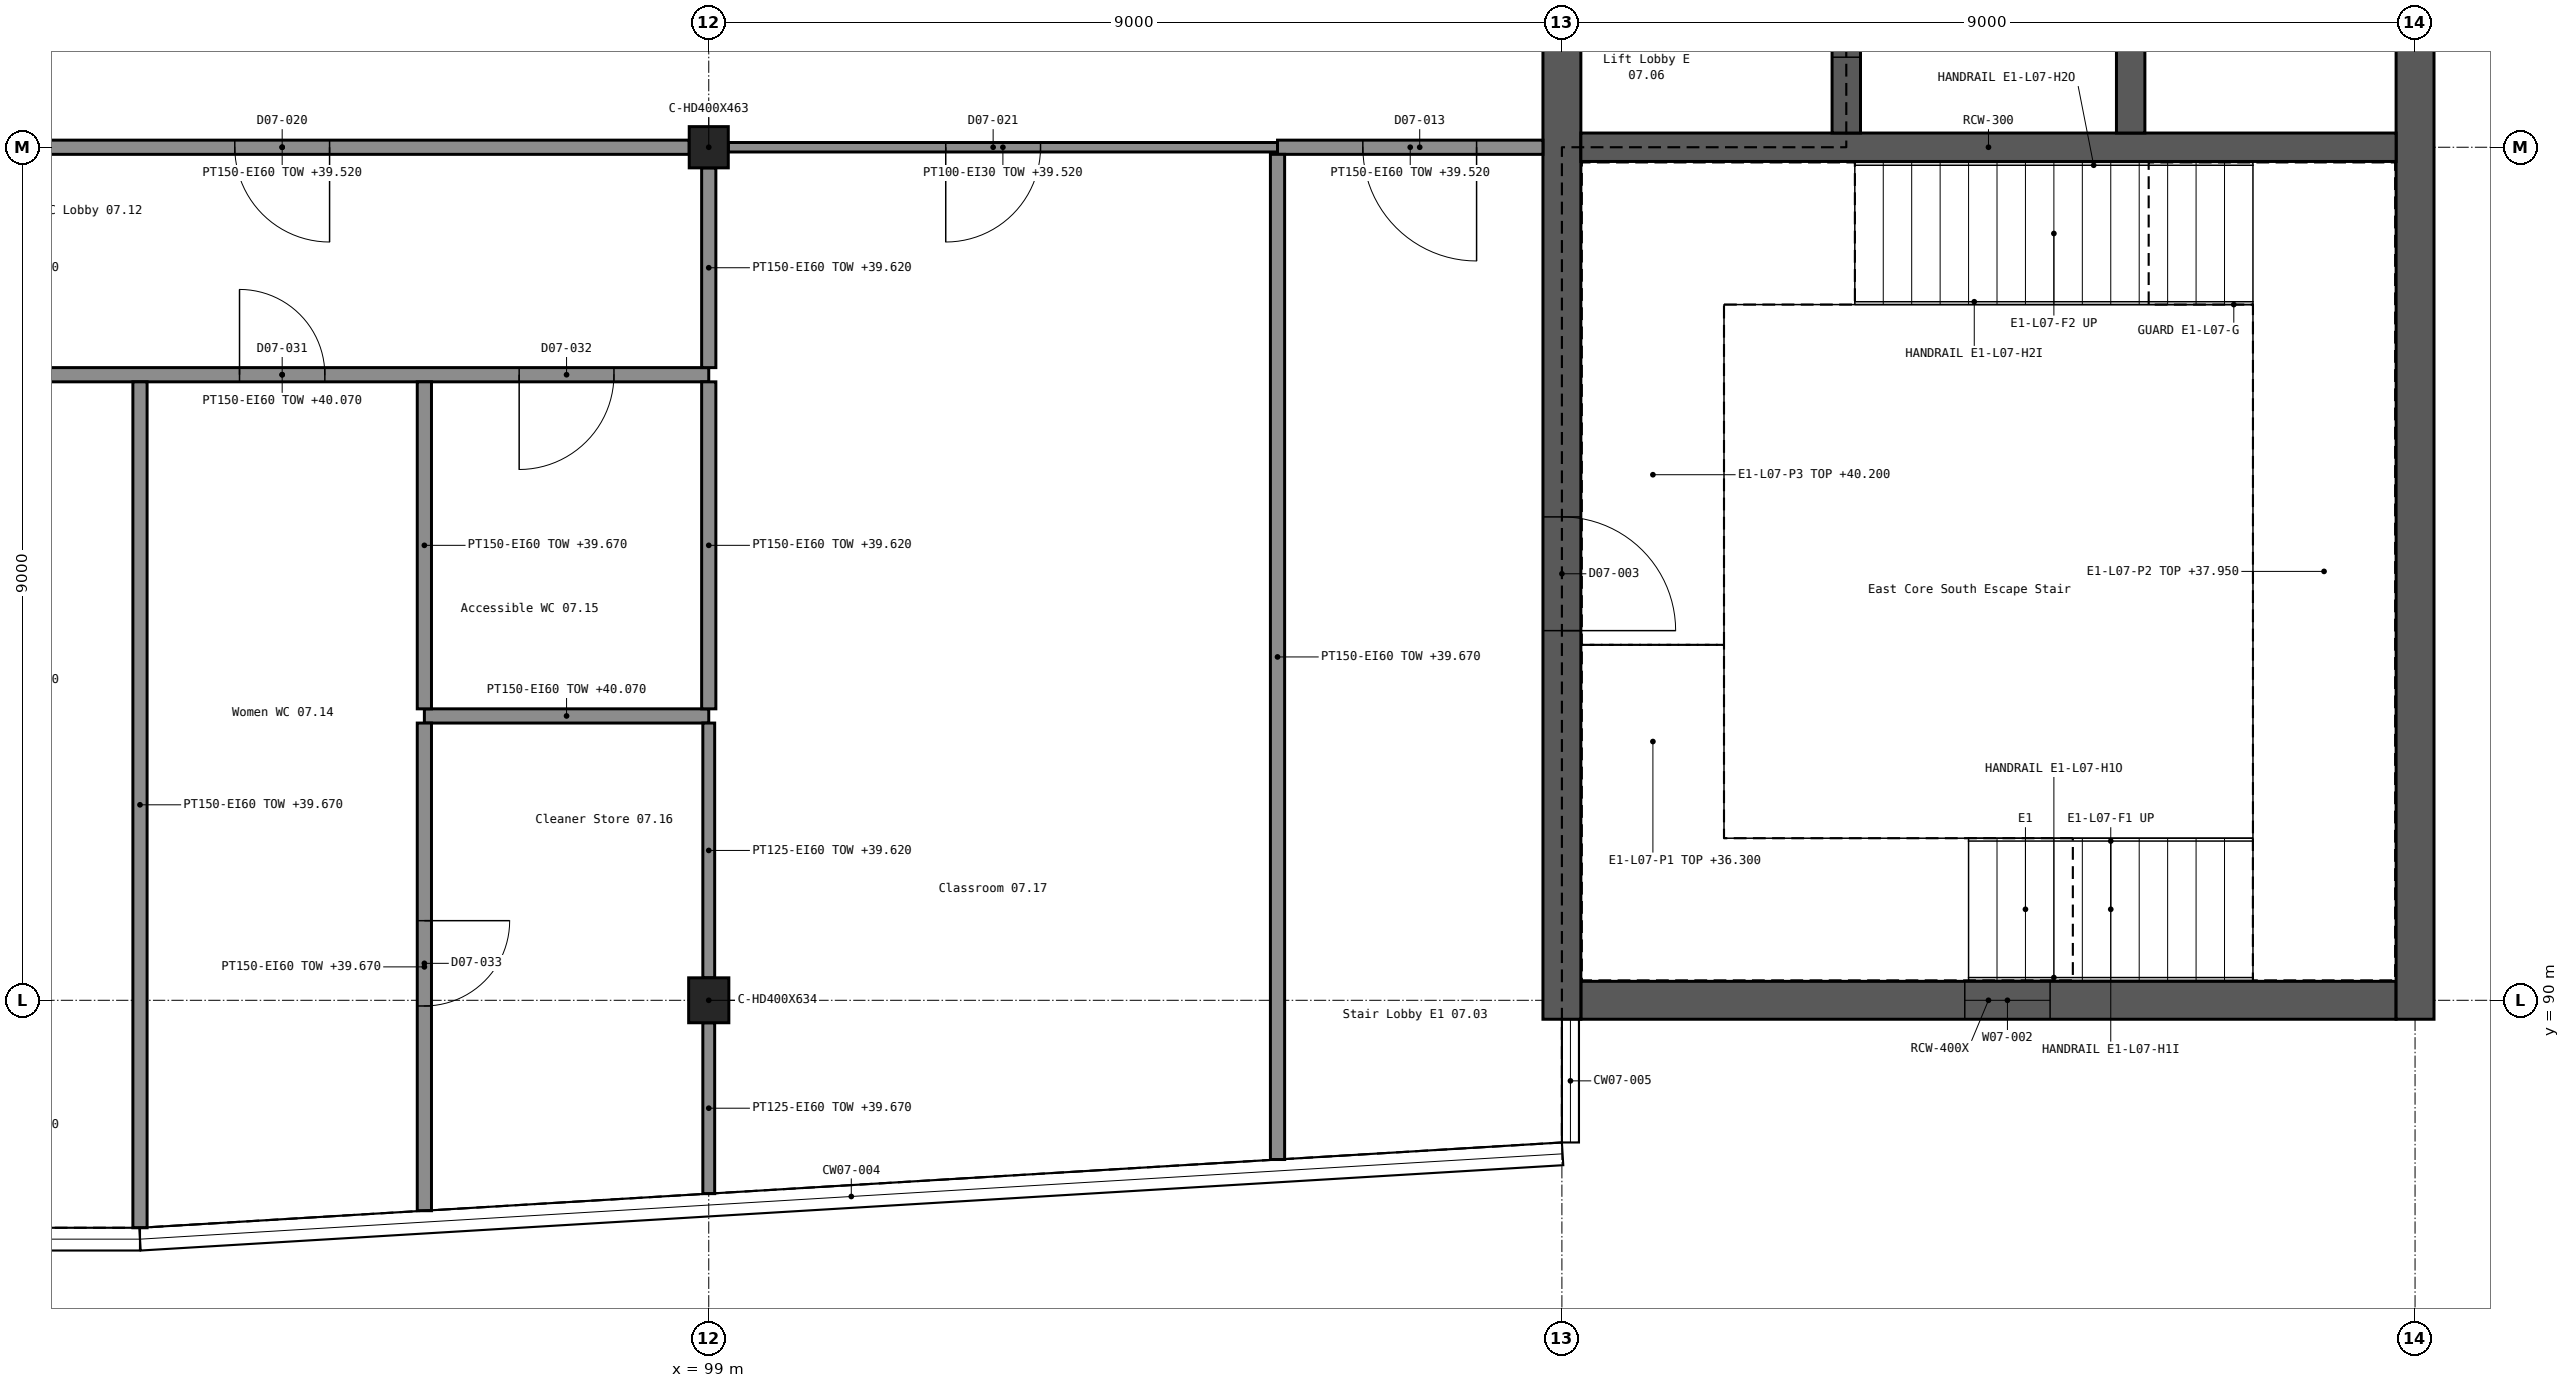
"""IFC4 building model, lengths in metres.
Left out: names, types, materials, properties, quantities, classifications, styles, units other than length and angle.
Written with IfcOpenShell. Run it as: python <this file> out.ifc"""

import sys

from ifc_helpers import new_model, si_unit, direction, frame, frame_2d, origin, origin_2d, place, context, subcontext, project, spatial, rectangle, i_section, extrude, element, fill, save


model = new_model("IFC4")
c1 = context("Model", 3, precision=1e-05, world=origin(), true_north=direction((0.0, 1.0)))
c2 = subcontext(c1, "Body", "Model", "MODEL_VIEW")
j1 = project(units=[si_unit("LENGTHUNIT", "METRE"), si_unit("PLANEANGLEUNIT", "RADIAN")], contexts=[c1])
p1 = place(None, origin())
s1 = spatial("IfcSite", under=j1, at=p1, CompositionType="ELEMENT")
p2 = place(p1, origin())
s2 = spatial("IfcBuilding", under=s1, at=p2, CompositionType="ELEMENT")
p3 = place(p2, frame((0.0, 0.0, 36.3)))
s3 = spatial("IfcBuildingStorey", under=s2, at=p3, CompositionType="ELEMENT", Elevation=36.3)
p4 = place(p3, frame((108.2, 90.0, 0.0), z_axis=(0.0, 0.0, 1.0), x_axis=(1.0, 0.0, 0.0)))
e1 = element("IfcWall", 1, at=p4, inside=s3, PredefinedType="SHEAR", context=c2, shape_type="SweptSolid", body=[
    extrude(rectangle(XDim=8.6, YDim=0.4, at=frame_2d((4.3, 0.0))), origin(), (0.0, 0.0, 1.0), 3.9),
])
p5 = place(p4, frame((4.05, 0.0, 1.2)))
e2 = element("IfcOpeningElement", 2, at=p5, cuts=e1, PredefinedType="OPENING", context=c2, shape_type="SweptSolid", body=[
    extrude(rectangle(XDim=0.9, YDim=1.5, at=frame_2d((0.45, 0.75))), frame((0.0, 0.211, 0.0), z_axis=(0.0, -1.0, 0.0), x_axis=(1.0, 0.0, 0.0)), (0.0, 0.0, 1.0), 0.422),
])
p6 = place(p3, frame((108.0, 89.8, 0.0), z_axis=(0.0, 0.0, 1.0), x_axis=(0.0, 1.0, 0.0)))
e3 = element("IfcWall", 3, at=p6, inside=s3, PredefinedType="SHEAR", context=c2, shape_type="SweptSolid", body=[
    extrude(rectangle(XDim=27.4, YDim=0.4, at=frame_2d((13.7, 0.0))), origin(), (0.0, 0.0, 1.0), 3.9),
])
p7 = place(p6, frame((4.1, 0.0, 0.0)))
e4 = element("IfcOpeningElement", 4, at=p7, cuts=e3, PredefinedType="OPENING", context=c2, shape_type="SweptSolid", body=[
    extrude(rectangle(XDim=1.2, YDim=2.1, at=frame_2d((0.6, 1.05))), frame((0.0, 0.211, 0.0), z_axis=(0.0, -1.0, 0.0), x_axis=(1.0, 0.0, 0.0)), (0.0, 0.0, 1.0), 0.422),
])
p8 = place(p6, frame((22.1, 0.0, 0.0)))
e5 = element("IfcOpeningElement", 5, at=p8, cuts=e3, PredefinedType="OPENING", context=c2, shape_type="SweptSolid", body=[
    extrude(rectangle(XDim=1.2, YDim=2.1, at=frame_2d((0.6, 1.05))), frame((0.0, 0.211, 0.0), z_axis=(0.0, -1.0, 0.0), x_axis=(1.0, 0.0, 0.0)), (0.0, 0.0, 1.0), 0.422),
])
p9 = place(p6, frame((12.5, 0.0, 0.0)))
e6 = element("IfcOpeningElement", 6, at=p9, cuts=e3, PredefinedType="OPENING", context=c2, shape_type="SweptSolid", body=[
    extrude(rectangle(XDim=2.0, YDim=2.1, at=frame_2d((1.0, 1.05))), frame((0.0, 0.211, 0.0), z_axis=(0.0, -1.0, 0.0), x_axis=(1.0, 0.0, 0.0)), (0.0, 0.0, 1.0), 0.422),
])
p10 = place(p3, frame((117.0, 89.8, 0.0), z_axis=(0.0, 0.0, 1.0), x_axis=(0.0, 1.0, 0.0)))
e7 = element("IfcWall", 7, at=p10, inside=s3, PredefinedType="SHEAR", context=c2, shape_type="SweptSolid", body=[
    extrude(rectangle(XDim=27.4, YDim=0.4, at=frame_2d((13.7, 0.0))), origin(), (0.0, 0.0, 1.0), 3.9),
])
p11 = place(p3, frame((108.2, 99.0, 0.0), z_axis=(0.0, 0.0, 1.0), x_axis=(1.0, 0.0, 0.0)))
e8 = element("IfcWall", 8, at=p11, inside=s3, PredefinedType="SHEAR", context=c2, shape_type="SweptSolid", body=[
    extrude(rectangle(XDim=8.6, YDim=0.3, at=frame_2d((4.3, 0.0))), origin(), (0.0, 0.0, 1.0), 3.9),
])
p12 = place(p3, frame((111.0, 99.15, 0.0), z_axis=(0.0, 0.0, 1.0), x_axis=(0.0, 1.0, 0.0)))
e9 = element("IfcWall", 9, at=p12, inside=s3, PredefinedType="SHEAR", context=c2, shape_type="SweptSolid", body=[
    extrude(rectangle(XDim=8.7, YDim=0.3, at=frame_2d((4.35, 0.0))), origin(), (0.0, 0.0, 1.0), 3.9),
])
p13 = place(p12, frame((0.8, 0.0, 0.0)))
e10 = element("IfcOpeningElement", 10, at=p13, cuts=e9, PredefinedType="OPENING", context=c2, shape_type="SweptSolid", body=[
    extrude(rectangle(XDim=1.1, YDim=2.1, at=frame_2d((0.55, 1.05))), frame((0.0, 0.161, 0.0), z_axis=(0.0, -1.0, 0.0), x_axis=(1.0, 0.0, 0.0)), (0.0, 0.0, 1.0), 0.322),
])
p14 = place(p12, frame((3.8, 0.0, 0.0)))
e11 = element("IfcOpeningElement", 11, at=p14, cuts=e9, PredefinedType="OPENING", context=c2, shape_type="SweptSolid", body=[
    extrude(rectangle(XDim=1.1, YDim=2.1, at=frame_2d((0.55, 1.05))), frame((0.0, 0.161, 0.0), z_axis=(0.0, -1.0, 0.0), x_axis=(1.0, 0.0, 0.0)), (0.0, 0.0, 1.0), 0.322),
])
p15 = place(p12, frame((6.8, 0.0, 0.0)))
e12 = element("IfcOpeningElement", 12, at=p15, cuts=e9, PredefinedType="OPENING", context=c2, shape_type="SweptSolid", body=[
    extrude(rectangle(XDim=1.1, YDim=2.1, at=frame_2d((0.55, 1.05))), frame((0.0, 0.161, 0.0), z_axis=(0.0, -1.0, 0.0), x_axis=(1.0, 0.0, 0.0)), (0.0, 0.0, 1.0), 0.322),
])
p16 = place(p3, frame((114.0, 99.15, 0.0), z_axis=(0.0, 0.0, 1.0), x_axis=(0.0, 1.0, 0.0)))
e13 = element("IfcWall", 13, at=p16, inside=s3, PredefinedType="SHEAR", context=c2, shape_type="SweptSolid", body=[
    extrude(rectangle(XDim=8.7, YDim=0.3, at=frame_2d((4.35, 0.0))), origin(), (0.0, 0.0, 1.0), 3.9),
])
p17 = place(p3, frame((99.0, 90.0, 0.0), z_axis=(0.0, 0.0, 1.0), x_axis=(1.0, 0.0, 0.0)))
e14 = element("IfcColumn", 14, at=p17, inside=s3, PredefinedType="COLUMN", context=c2, shape_type="SweptSolid", body=[
    extrude(i_section(OverallWidth=0.424, OverallDepth=0.474, WebThickness=0.048, FlangeThickness=0.077, FilletRadius=0.015, at=origin_2d()), origin(), (0.0, 0.0, 1.0), 3.9),
])
p18 = place(p3, frame((99.0, 99.0, 0.0), z_axis=(0.0, 0.0, 1.0), x_axis=(1.0, 0.0, 0.0)))
e15 = element("IfcColumn", 15, at=p18, inside=s3, PredefinedType="COLUMN", context=c2, shape_type="SweptSolid", body=[
    extrude(i_section(OverallWidth=0.412, OverallDepth=0.435, WebThickness=0.036, FlangeThickness=0.057, FilletRadius=0.015, at=origin_2d()), origin(), (0.0, 0.0, 1.0), 3.9),
])
p19 = place(p3, frame((96.0, 93.0, 0.0), z_axis=(0.0, 0.0, 1.0), x_axis=(1.0, 0.0, 0.0)))
e16 = element("IfcWall", 16, at=p19, inside=s3, PredefinedType="PARTITIONING", context=c2, shape_type="SweptSolid", body=[
    extrude(rectangle(XDim=3.0, YDim=0.15, at=frame_2d((1.5, 0.0))), origin(), (0.0, 0.0, 1.0), 3.77),
])
p20 = place(p3, frame((90.0, 96.6, 0.0), z_axis=(0.0, 0.0, 1.0), x_axis=(1.0, 0.0, 0.0)))
e17 = element("IfcWall", 17, at=p20, inside=s3, PredefinedType="PARTITIONING", context=c2, shape_type="SweptSolid", body=[
    extrude(rectangle(XDim=9.0, YDim=0.15, at=frame_2d((4.5, 0.0))), origin(), (0.0, 0.0, 1.0), 3.77),
])
p21 = place(p20, frame((1.05, 0.0, 0.0)))
e18 = element("IfcOpeningElement", 18, at=p21, cuts=e17, PredefinedType="OPENING", context=c2, shape_type="SweptSolid", body=[
    extrude(rectangle(XDim=0.9, YDim=2.1, at=frame_2d((0.45, 1.05))), frame((0.0, 0.086, 0.0), z_axis=(0.0, -1.0, 0.0), x_axis=(1.0, 0.0, 0.0)), (0.0, 0.0, 1.0), 0.172),
])
p22 = place(p20, frame((4.05, 0.0, 0.0)))
e19 = element("IfcOpeningElement", 19, at=p22, cuts=e17, PredefinedType="OPENING", context=c2, shape_type="SweptSolid", body=[
    extrude(rectangle(XDim=0.9, YDim=2.1, at=frame_2d((0.45, 1.05))), frame((0.0, 0.086, 0.0), z_axis=(0.0, -1.0, 0.0), x_axis=(1.0, 0.0, 0.0)), (0.0, 0.0, 1.0), 0.172),
])
p23 = place(p20, frame((7.0, 0.0, 0.0)))
e20 = element("IfcOpeningElement", 20, at=p23, cuts=e17, PredefinedType="OPENING", context=c2, shape_type="SweptSolid", body=[
    extrude(rectangle(XDim=1.0, YDim=2.1, at=frame_2d((0.5, 1.05))), frame((0.0, 0.086, 0.0), z_axis=(0.0, -1.0, 0.0), x_axis=(1.0, 0.0, 0.0)), (0.0, 0.0, 1.0), 0.172),
])
p24 = place(p3, frame((99.206, 99.0, 0.0), z_axis=(0.0, 0.0, 1.0), x_axis=(1.0, 0.0, 0.0)))
e21 = element("IfcWall", 21, at=p24, inside=s3, PredefinedType="PARTITIONING", context=c2, shape_type="SweptSolid", body=[
    extrude(rectangle(XDim=5.794, YDim=0.1, at=frame_2d((2.897, 0.0))), origin(), (0.0, 0.0, 1.0), 3.22),
])
p25 = place(p24, frame((2.294, 0.0, 0.0)))
e22 = element("IfcOpeningElement", 22, at=p25, cuts=e21, PredefinedType="OPENING", context=c2, shape_type="SweptSolid", body=[
    extrude(rectangle(XDim=1.0, YDim=2.1, at=frame_2d((0.5, 1.05))), frame((0.0, 0.061, 0.0), z_axis=(0.0, -1.0, 0.0), x_axis=(1.0, 0.0, 0.0)), (0.0, 0.0, 1.0), 0.122),
])
p26 = place(p3, frame((90.206, 99.0, 0.0), z_axis=(0.0, 0.0, 1.0), x_axis=(1.0, 0.0, 0.0)))
e23 = element("IfcWall", 23, at=p26, inside=s3, PredefinedType="PARTITIONING", context=c2, shape_type="SweptSolid", body=[
    extrude(rectangle(XDim=8.588, YDim=0.15, at=frame_2d((4.294, 0.0))), origin(), (0.0, 0.0, 1.0), 3.22),
])
p27 = place(p26, frame((3.794, 0.0, 0.0)))
e24 = element("IfcOpeningElement", 24, at=p27, cuts=e23, PredefinedType="OPENING", context=c2, shape_type="SweptSolid", body=[
    extrude(rectangle(XDim=1.0, YDim=2.1, at=frame_2d((0.5, 1.05))), frame((0.0, 0.086, 0.0), z_axis=(0.0, -1.0, 0.0), x_axis=(1.0, 0.0, 0.0)), (0.0, 0.0, 1.0), 0.172),
])
p28 = place(p3, frame((105.0, 99.0, 0.0), z_axis=(0.0, 0.0, 1.0), x_axis=(1.0, 0.0, 0.0)))
e25 = element("IfcWall", 25, at=p28, inside=s3, PredefinedType="PARTITIONING", context=c2, shape_type="SweptSolid", body=[
    extrude(rectangle(XDim=2.8, YDim=0.15, at=frame_2d((1.4, 0.0))), origin(), (0.0, 0.0, 1.0), 3.22),
])
p29 = place(p28, frame((0.9, 0.0, 0.0)))
e26 = element("IfcOpeningElement", 26, at=p29, cuts=e25, PredefinedType="OPENING", context=c2, shape_type="SweptSolid", body=[
    extrude(rectangle(XDim=1.2, YDim=2.1, at=frame_2d((0.6, 1.05))), frame((0.0, 0.086, 0.0), z_axis=(0.0, -1.0, 0.0), x_axis=(1.0, 0.0, 0.0)), (0.0, 0.0, 1.0), 0.172),
])
p30 = place(p3, frame((93.0, 87.6, 0.0), z_axis=(0.0, 0.0, 1.0), x_axis=(0.0, 1.0, 0.0)))
e27 = element("IfcWall", 27, at=p30, inside=s3, PredefinedType="PARTITIONING", context=c2, shape_type="SweptSolid", body=[
    extrude(rectangle(XDim=8.925, YDim=0.15, at=frame_2d((4.462, 0.0))), origin(), (0.0, 0.0, 1.0), 3.37),
])
p31 = place(p3, frame((96.0, 87.78, 0.0), z_axis=(0.0, 0.0, 1.0), x_axis=(0.0, 1.0, 0.0)))
e28 = element("IfcWall", 28, at=p31, inside=s3, PredefinedType="PARTITIONING", context=c2, shape_type="SweptSolid", body=[
    extrude(rectangle(XDim=5.145, YDim=0.15, at=frame_2d((2.573, 0.0))), origin(), (0.0, 0.0, 1.0), 3.37),
])
p32 = place(p31, frame((2.16, 0.0, 0.0)))
e29 = element("IfcOpeningElement", 29, at=p32, cuts=e28, PredefinedType="OPENING", context=c2, shape_type="SweptSolid", body=[
    extrude(rectangle(XDim=0.9, YDim=2.1, at=frame_2d((0.45, 1.05))), frame((0.0, 0.086, 0.0), z_axis=(0.0, -1.0, 0.0), x_axis=(1.0, 0.0, 0.0)), (0.0, 0.0, 1.0), 0.172),
])
p33 = place(p3, frame((96.0, 93.075, 0.0), z_axis=(0.0, 0.0, 1.0), x_axis=(0.0, 1.0, 0.0)))
e30 = element("IfcWall", 30, at=p33, inside=s3, PredefinedType="PARTITIONING", context=c2, shape_type="SweptSolid", body=[
    extrude(rectangle(XDim=3.45, YDim=0.15, at=frame_2d((1.725, 0.0))), origin(), (0.0, 0.0, 1.0), 3.37),
])
p34 = place(p3, frame((99.0, 87.96, 0.0), z_axis=(0.0, 0.0, 1.0), x_axis=(0.0, 1.0, 0.0)))
e31 = element("IfcWall", 31, at=p34, inside=s3, PredefinedType="PARTITIONING", context=c2, shape_type="SweptSolid", body=[
    extrude(rectangle(XDim=1.803, YDim=0.125, at=frame_2d((0.901, 0.0))), origin(), (0.0, 0.0, 1.0), 3.37),
])
p35 = place(p3, frame((99.0, 90.237, 0.0), z_axis=(0.0, 0.0, 1.0), x_axis=(0.0, 1.0, 0.0)))
e32 = element("IfcWall", 32, at=p35, inside=s3, PredefinedType="PARTITIONING", context=c2, shape_type="SweptSolid", body=[
    extrude(rectangle(XDim=2.688, YDim=0.125, at=frame_2d((1.344, 0.0))), origin(), (0.0, 0.0, 1.0), 3.32),
])
p36 = place(p3, frame((99.0, 93.075, 0.0), z_axis=(0.0, 0.0, 1.0), x_axis=(0.0, 1.0, 0.0)))
e33 = element("IfcWall", 33, at=p36, inside=s3, PredefinedType="PARTITIONING", context=c2, shape_type="SweptSolid", body=[
    extrude(rectangle(XDim=3.45, YDim=0.15, at=frame_2d((1.725, 0.0))), origin(), (0.0, 0.0, 1.0), 3.32),
])
p37 = place(p3, frame((99.0, 96.675, 0.0), z_axis=(0.0, 0.0, 1.0), x_axis=(0.0, 1.0, 0.0)))
e34 = element("IfcWall", 34, at=p37, inside=s3, PredefinedType="PARTITIONING", context=c2, shape_type="SweptSolid", body=[
    extrude(rectangle(XDim=2.107, YDim=0.15, at=frame_2d((1.054, 0.0))), origin(), (0.0, 0.0, 1.0), 3.32),
])
p38 = place(p3, frame((105.0, 88.32, 0.0), z_axis=(0.0, 0.0, 1.0), x_axis=(0.0, 1.0, 0.0)))
e35 = element("IfcWall", 35, at=p38, inside=s3, PredefinedType="PARTITIONING", context=c2, shape_type="SweptSolid", body=[
    extrude(rectangle(XDim=10.605, YDim=0.15, at=frame_2d((5.302, 0.0))), origin(), (0.0, 0.0, 1.0), 3.37),
])
p39 = place(p5, origin())
e36 = element("IfcWindow", 36, at=p39, inside=s3, PartitioningType="SINGLE_PANEL", PredefinedType="WINDOW", context=c2, shape_type="SweptSolid", body=[
    extrude(rectangle(XDim=0.9, YDim=1.5, at=frame_2d((0.45, 0.75))), frame((0.0, 0.03, 0.0), z_axis=(0.0, -1.0, 0.0), x_axis=(1.0, 0.0, 0.0)), (0.0, 0.0, 1.0), 0.06),
])
fill(e2, e36)
p40 = place(p7, frame((1.2, 0.0, 0.0), z_axis=(0.0, 0.0, 1.0), x_axis=(-1.0, 0.0, 0.0)))
e37 = element("IfcDoor", 37, at=p40, inside=s3, OperationType="SINGLE_SWING_RIGHT", PredefinedType="DOOR", context=c2, shape_type="SweptSolid", body=[
    extrude(rectangle(XDim=1.2, YDim=2.1, at=frame_2d((0.6, 1.05))), frame((0.0, 0.025, 0.0), z_axis=(0.0, -1.0, 0.0), x_axis=(1.0, 0.0, 0.0)), (0.0, 0.0, 1.0), 0.05),
])
fill(e4, e37)
p41 = place(p13, origin())
e38 = element("IfcDoor", 38, at=p41, inside=s3, OperationType="DOUBLE_DOOR_SLIDING", PredefinedType="DOOR", context=c2, shape_type="SweptSolid", body=[
    extrude(rectangle(XDim=1.1, YDim=2.1, at=frame_2d((0.55, 1.05))), frame((0.0, 0.025, 0.0), z_axis=(0.0, -1.0, 0.0), x_axis=(1.0, 0.0, 0.0)), (0.0, 0.0, 1.0), 0.05),
])
fill(e10, e38)
p42 = place(p29, frame((1.2, 0.0, 0.0), z_axis=(0.0, 0.0, 1.0), x_axis=(-1.0, 0.0, 0.0)))
e39 = element("IfcDoor", 39, at=p42, inside=s3, OperationType="SINGLE_SWING_LEFT", PredefinedType="DOOR", context=c2, shape_type="SweptSolid", body=[
    extrude(rectangle(XDim=1.2, YDim=2.1, at=frame_2d((0.6, 1.05))), frame((0.0, 0.025, 0.0), z_axis=(0.0, -1.0, 0.0), x_axis=(1.0, 0.0, 0.0)), (0.0, 0.0, 1.0), 0.05),
])
fill(e26, e39)
p43 = place(p27, frame((1.0, 0.0, 0.0), z_axis=(0.0, 0.0, 1.0), x_axis=(-1.0, 0.0, 0.0)))
e40 = element("IfcDoor", 40, at=p43, inside=s3, OperationType="SINGLE_SWING_LEFT", PredefinedType="DOOR", context=c2, shape_type="SweptSolid", body=[
    extrude(rectangle(XDim=1.0, YDim=2.1, at=frame_2d((0.5, 1.05))), frame((0.0, 0.025, 0.0), z_axis=(0.0, -1.0, 0.0), x_axis=(1.0, 0.0, 0.0)), (0.0, 0.0, 1.0), 0.05),
])
fill(e24, e40)
p44 = place(p25, frame((1.0, 0.0, 0.0), z_axis=(0.0, 0.0, 1.0), x_axis=(-1.0, 0.0, 0.0)))
e41 = element("IfcDoor", 41, at=p44, inside=s3, OperationType="SINGLE_SWING_RIGHT", PredefinedType="DOOR", context=c2, shape_type="SweptSolid", body=[
    extrude(rectangle(XDim=1.0, YDim=2.1, at=frame_2d((0.5, 1.05))), frame((0.0, 0.025, 0.0), z_axis=(0.0, -1.0, 0.0), x_axis=(1.0, 0.0, 0.0)), (0.0, 0.0, 1.0), 0.05),
])
fill(e22, e41)
p45 = place(p22, origin())
e42 = element("IfcDoor", 42, at=p45, inside=s3, OperationType="SINGLE_SWING_LEFT", PredefinedType="DOOR", context=c2, shape_type="SweptSolid", body=[
    extrude(rectangle(XDim=0.9, YDim=2.1, at=frame_2d((0.45, 1.05))), frame((0.0, 0.025, 0.0), z_axis=(0.0, -1.0, 0.0), x_axis=(1.0, 0.0, 0.0)), (0.0, 0.0, 1.0), 0.05),
])
fill(e19, e42)
p46 = place(p23, frame((1.0, 0.0, 0.0), z_axis=(0.0, 0.0, 1.0), x_axis=(-1.0, 0.0, 0.0)))
e43 = element("IfcDoor", 43, at=p46, inside=s3, OperationType="SINGLE_SWING_RIGHT", PredefinedType="DOOR", context=c2, shape_type="SweptSolid", body=[
    extrude(rectangle(XDim=1.0, YDim=2.1, at=frame_2d((0.5, 1.05))), frame((0.0, 0.025, 0.0), z_axis=(0.0, -1.0, 0.0), x_axis=(1.0, 0.0, 0.0)), (0.0, 0.0, 1.0), 0.05),
])
fill(e20, e43)
p47 = place(p32, frame((0.9, 0.0, 0.0), z_axis=(0.0, 0.0, 1.0), x_axis=(-1.0, 0.0, 0.0)))
e44 = element("IfcDoor", 44, at=p47, inside=s3, OperationType="SINGLE_SWING_LEFT", PredefinedType="DOOR", context=c2, shape_type="SweptSolid", body=[
    extrude(rectangle(XDim=0.9, YDim=2.1, at=frame_2d((0.45, 1.05))), frame((0.0, 0.025, 0.0), z_axis=(0.0, -1.0, 0.0), x_axis=(1.0, 0.0, 0.0)), (0.0, 0.0, 1.0), 0.05),
])
fill(e29, e44)
save(model, sys.argv[1])
